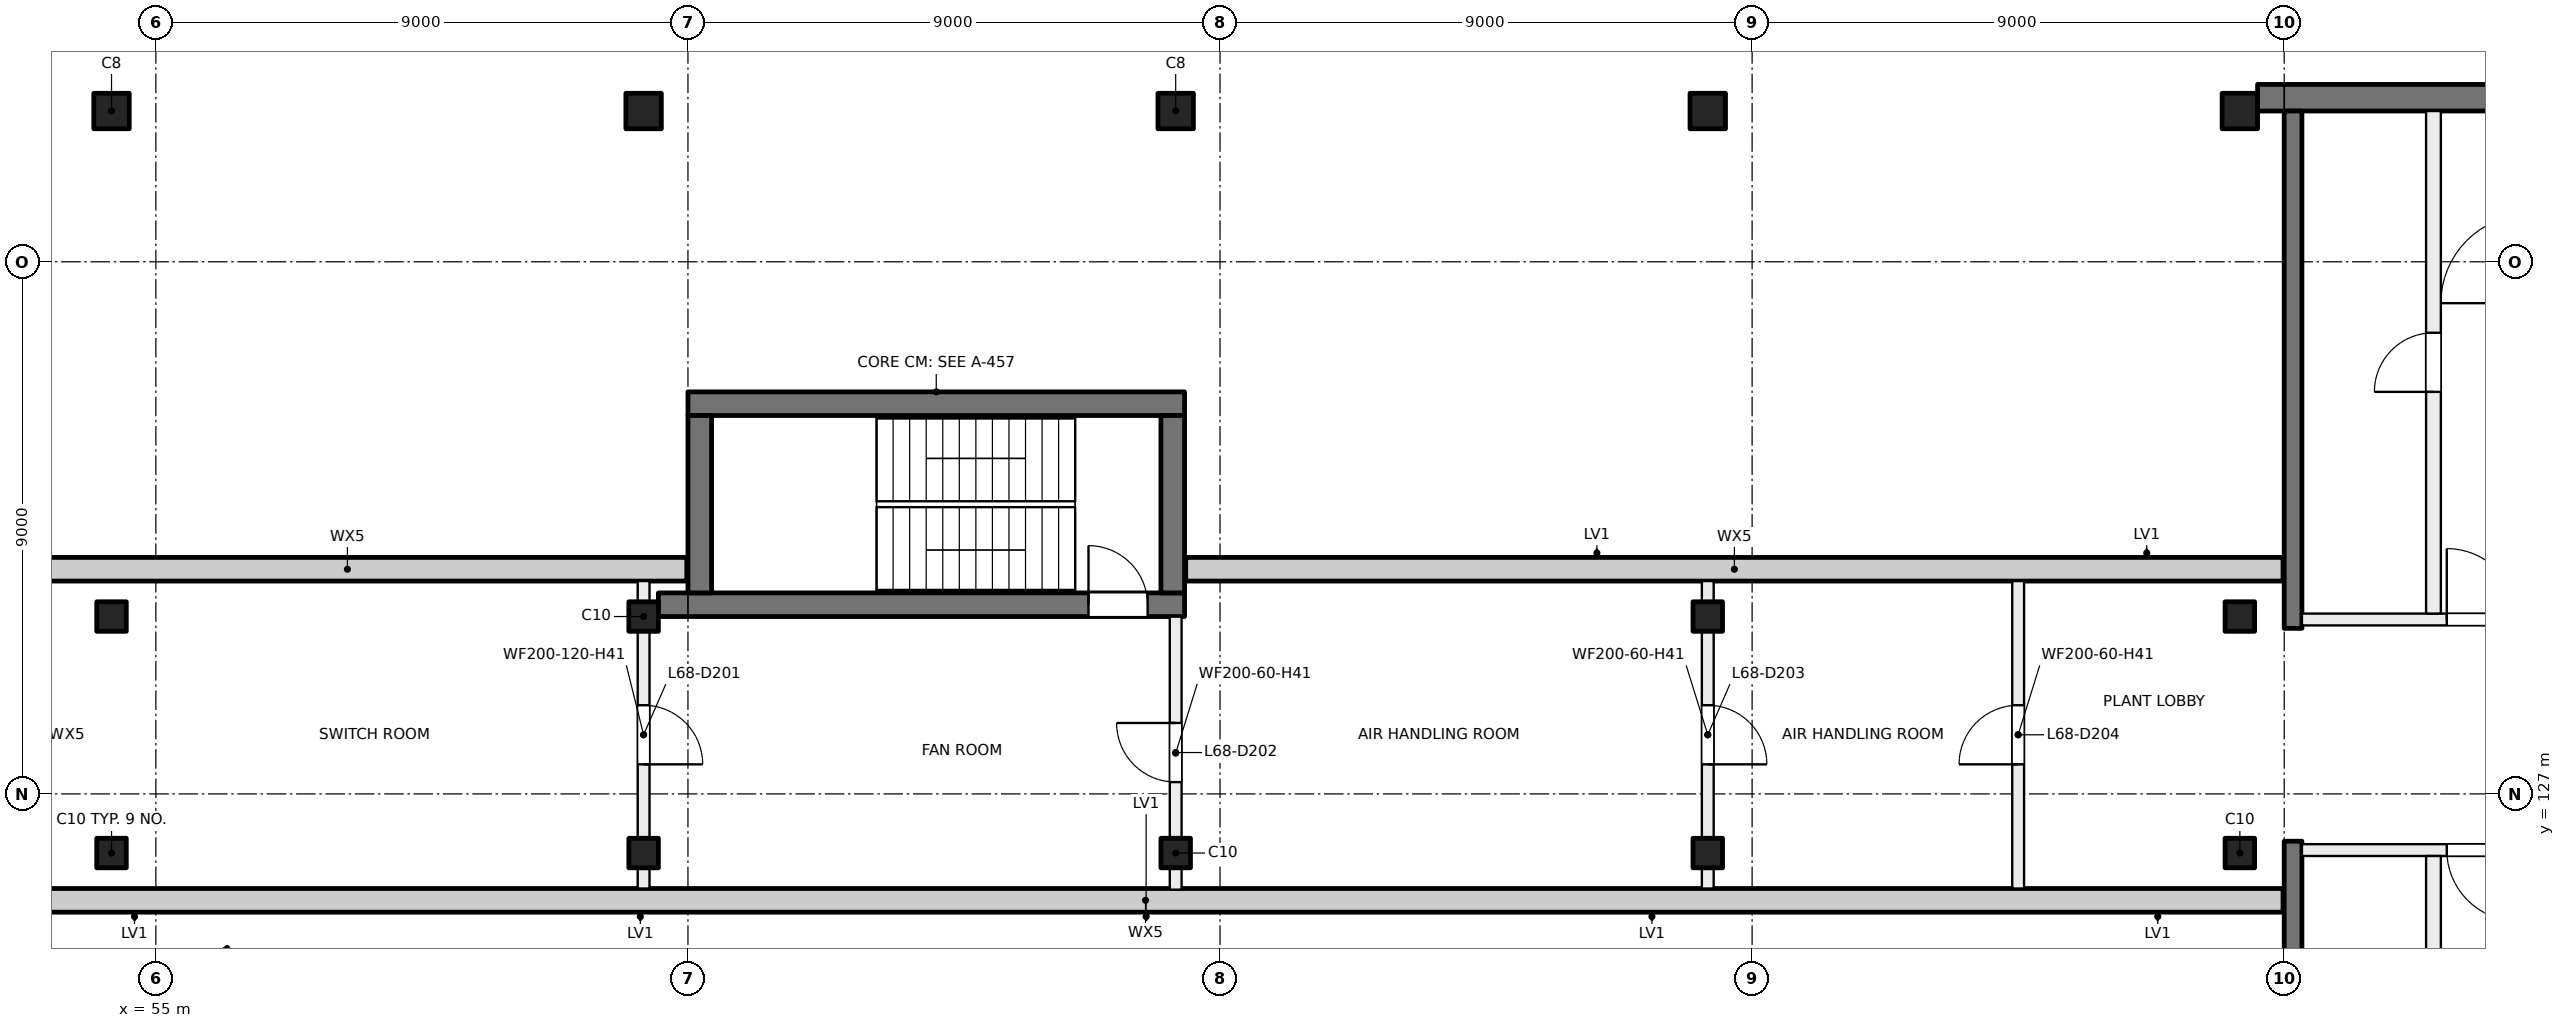
"""IFC4 building model, lengths in metres.
Left out: names, types, materials, properties, quantities, classifications, styles, units other than length and angle.
Written with IfcOpenShell. Run it as: python <this file> out.ifc"""

import sys

from ifc_helpers import new_model, si_unit, direction, frame, frame_2d, origin, origin_2d, place, context, subcontext, project, spatial, rectangle, hollow_rectangle, extrude, element, fill, save


model = new_model("IFC4")
c1 = context("Model", 3, precision=1e-05, world=origin(), true_north=direction((0.0, 1.0)))
c2 = subcontext(c1, "Body", "Model", "MODEL_VIEW")
j1 = project(units=[si_unit("LENGTHUNIT", "METRE"), si_unit("PLANEANGLEUNIT", "RADIAN")], contexts=[c1])
p1 = place(None, origin())
s1 = spatial("IfcSite", under=j1, at=p1, CompositionType="ELEMENT")
p2 = place(p1, origin())
s2 = spatial("IfcBuilding", under=s1, at=p2, CompositionType="ELEMENT")
p3 = place(p2, frame((0.0, 0.0, 286.5)))
s3 = spatial("IfcBuildingStorey", under=s2, at=p3, CompositionType="ELEMENT", Elevation=286.5)
p4 = place(p3, frame((56.036, 123.43, 0.0), z_axis=(0.0, 0.0, 1.0), x_axis=(0.573576436351, -0.819152044289, 0.0)))
e1 = element("IfcColumn", 1, at=p4, inside=s3, PredefinedType="COLUMN", context=c2, shape_type="SweptSolid", body=[
    extrude(hollow_rectangle(XDim=1.4, YDim=1.4, WallThickness=0.025, at=origin_2d()), origin(), (0.0, 0.0, 1.0), 4.5),
])
for number, where, z_axis, x_axis in (
    (2, (54.25, 130.0, 0.0), (0.0, 0.0, 1.0), (1.0, 0.0, 0.0)),
    (3, (63.25, 130.0, 0.0), (0.0, 0.0, 1.0), (1.0, 0.0, 0.0)),
    (4, (81.25, 130.0, 0.0), (0.0, 0.0, 1.0), (1.0, 0.0, 0.0)),
    (5, (90.25, 130.0, 0.0), (0.0, 0.0, 1.0), (1.0, 0.0, 0.0)),
    (6, (54.25, 126.0, 0.0), (0.0, 0.0, 1.0), (1.0, 0.0, 0.0)),
    (7, (63.25, 126.0, 0.0), (0.0, 0.0, 1.0), (1.0, 0.0, 0.0)),
    (8, (72.25, 126.0, 0.0), (0.0, 0.0, 1.0), (1.0, 0.0, 0.0)),
    (9, (81.25, 126.0, 0.0), (0.0, 0.0, 1.0), (1.0, 0.0, 0.0)),
    (10, (90.25, 126.0, 0.0), (0.0, 0.0, 1.0), (1.0, 0.0, 0.0)),
):
    element("IfcColumn", number, at=place(p3, frame(where, z_axis=z_axis, x_axis=x_axis)), inside=s3, PredefinedType="COLUMN", context=c2, shape_type="SweptSolid", body=[
        extrude(rectangle(XDim=0.5, YDim=0.5, at=origin_2d()), origin(), (0.0, 0.0, 1.0), 4.5),
    ])
for number, where, z_axis, x_axis in (
    (11, (54.25, 138.55, 0.0), (0.0, 0.0, 1.0), (1.0, 0.0, 0.0)),
    (12, (63.25, 138.55, 0.0), (0.0, 0.0, 1.0), (1.0, 0.0, 0.0)),
    (13, (72.25, 138.55, 0.0), (0.0, 0.0, 1.0), (1.0, 0.0, 0.0)),
    (14, (81.25, 138.55, 0.0), (0.0, 0.0, 1.0), (1.0, 0.0, 0.0)),
    (15, (90.25, 138.55, 0.0), (0.0, 0.0, 1.0), (1.0, 0.0, 0.0)),
):
    element("IfcColumn", number, at=place(p3, frame(where, z_axis=z_axis, x_axis=x_axis)), inside=s3, PredefinedType="COLUMN", context=c2, shape_type="SweptSolid", body=[
        extrude(rectangle(XDim=0.6, YDim=0.6, at=origin_2d()), origin(), (0.0, 0.0, 1.0), 4.5),
    ])
p5 = place(p3, frame((99.6, 138.775, 0.0), z_axis=(0.0, 0.0, 1.0), x_axis=(-1.0, 0.0, 0.0)))
e16 = element("IfcWall", 16, at=p5, inside=s3, PredefinedType="SHEAR", context=c2, shape_type="SweptSolid", body=[
    extrude(rectangle(XDim=9.05, YDim=0.45, at=frame_2d((4.525, 0.0))), origin(), (0.0, 0.0, 1.0), 4.5),
])
for number, where, z_axis, x_axis in (
    (17, (91.15, 138.55, 0.0), (0.0, 0.0, 1.0), (0.0, -1.0, 0.0)),
    (18, (91.15, 126.2, 0.0), (0.0, 0.0, 1.0), (0.0, -1.0, 0.0)),
):
    element("IfcWall", number, at=place(p3, frame(where, z_axis=z_axis, x_axis=x_axis)), inside=s3, PredefinedType="SHEAR", context=c2, shape_type="SweptSolid", body=[
        extrude(rectangle(XDim=8.75, YDim=0.3, at=frame_2d((4.375, 0.0))), origin(), (0.0, 0.0, 1.0), 4.5),
    ])
p6 = place(p3, frame((63.5, 130.2, 0.0), z_axis=(0.0, 0.0, 1.0), x_axis=(1.0, 0.0, 0.0)))
e19 = element("IfcWall", 19, at=p6, inside=s3, PredefinedType="SHEAR", context=c2, shape_type="SweptSolid", body=[
    extrude(rectangle(XDim=8.9, YDim=0.4, at=frame_2d((4.45, 0.0))), origin(), (0.0, 0.0, 1.0), 4.5),
])
p7 = place(p6, frame((7.275, 0.0, 0.0)))
e20 = element("IfcOpeningElement", 20, at=p7, cuts=e19, PredefinedType="OPENING", context=c2, shape_type="SweptSolid", body=[
    extrude(rectangle(XDim=1.0, YDim=2.1, at=frame_2d((0.5, 1.05))), frame((0.0, 0.21, 0.0), z_axis=(0.0, -1.0, 0.0), x_axis=(1.0, 0.0, 0.0)), (0.0, 0.0, 1.0), 0.42),
])
p8 = place(p3, frame((64.0, 133.6, 0.0), z_axis=(0.0, 0.0, 1.0), x_axis=(1.0, 0.0, 0.0)))
e21 = element("IfcWall", 21, at=p8, inside=s3, PredefinedType="SHEAR", context=c2, shape_type="SweptSolid", body=[
    extrude(rectangle(XDim=8.4, YDim=0.4, at=frame_2d((4.2, 0.0))), origin(), (0.0, 0.0, 1.0), 4.5),
])
for number, where, z_axis, x_axis in (
    (22, (64.2, 130.4, 0.0), (0.0, 0.0, 1.0), (0.0, 1.0, 0.0)),
    (23, (72.2, 130.4, 0.0), (0.0, 0.0, 1.0), (0.0, 1.0, 0.0)),
):
    element("IfcWall", number, at=place(p3, frame(where, z_axis=z_axis, x_axis=x_axis)), inside=s3, PredefinedType="SHEAR", context=c2, shape_type="SweptSolid", body=[
        extrude(rectangle(XDim=3.0, YDim=0.4, at=frame_2d((1.5, 0.0))), origin(), (0.0, 0.0, 1.0), 4.5),
    ])
p9 = place(p3, frame((52.5, 130.8, 0.0), z_axis=(0.0, 0.0, 1.0), x_axis=(1.0, 0.0, 0.0)))
e24 = element("IfcWall", 24, at=p9, inside=s3, PredefinedType="SOLIDWALL", context=c2, shape_type="SweptSolid", body=[
    extrude(rectangle(XDim=11.48, YDim=0.4, at=frame_2d((5.74, 0.0))), origin(), (0.0, 0.0, 1.0), 4.125),
])
p10 = place(p3, frame((90.98, 125.2, 0.0), z_axis=(0.0, 0.0, 1.0), x_axis=(-1.0, 0.0, 0.0)))
e25 = element("IfcWall", 25, at=p10, inside=s3, PredefinedType="SOLIDWALL", context=c2, shape_type="SweptSolid", body=[
    extrude(rectangle(XDim=38.48, YDim=0.4, at=frame_2d((19.24, 0.0))), origin(), (0.0, 0.0, 1.0), 4.125),
])
p11 = place(p3, frame((72.42, 130.8, 0.0), z_axis=(0.0, 0.0, 1.0), x_axis=(1.0, 0.0, 0.0)))
e26 = element("IfcWall", 26, at=p11, inside=s3, PredefinedType="SOLIDWALL", context=c2, shape_type="SweptSolid", body=[
    extrude(rectangle(XDim=18.56, YDim=0.4, at=frame_2d((9.28, 0.0))), origin(), (0.0, 0.0, 1.0), 4.125),
])
p12 = place(p3, frame((95.25, 126.05, 0.0), z_axis=(0.0, 0.0, 1.0), x_axis=(-1.0, 0.0, 0.0)))
e27 = element("IfcWall", 27, at=p12, inside=s3, PredefinedType="PARTITIONING", context=c2, shape_type="SweptSolid", body=[
    extrude(rectangle(XDim=3.95, YDim=0.2, at=frame_2d((1.975, 0.0))), origin(), (0.0, 0.0, 1.0), 4.125),
])
p13 = place(p12, frame((0.3, 0.0, 0.0)))
e28 = element("IfcOpeningElement", 28, at=p13, cuts=e27, PredefinedType="OPENING", context=c2, shape_type="SweptSolid", body=[
    extrude(rectangle(XDim=1.2, YDim=2.1, at=frame_2d((0.6, 1.05))), frame((0.0, 0.11, 0.0), z_axis=(0.0, -1.0, 0.0), x_axis=(1.0, 0.0, 0.0)), (0.0, 0.0, 1.0), 0.22),
])
p14 = place(p3, frame((93.525, 117.45, 0.0), z_axis=(0.0, 0.0, 1.0), x_axis=(0.0, 1.0, 0.0)))
e29 = element("IfcWall", 29, at=p14, inside=s3, PredefinedType="PARTITIONING", context=c2, shape_type="SweptSolid", body=[
    extrude(rectangle(XDim=8.5, YDim=0.25, at=frame_2d((4.25, 0.0))), origin(), (0.0, 0.0, 1.0), 4.125),
])
p15 = place(p14, frame((5.29, 0.0, 0.0)))
e30 = element("IfcOpeningElement", 30, at=p15, cuts=e29, PredefinedType="OPENING", context=c2, shape_type="SweptSolid", body=[
    extrude(rectangle(XDim=0.8, YDim=2.1, at=frame_2d((0.4, 1.05))), frame((0.0, 0.135, 0.0), z_axis=(0.0, -1.0, 0.0), x_axis=(1.0, 0.0, 0.0)), (0.0, 0.0, 1.0), 0.27),
])
p16 = place(p14, frame((0.99, 0.0, 0.0)))
e31 = element("IfcOpeningElement", 31, at=p16, cuts=e29, PredefinedType="OPENING", context=c2, shape_type="SweptSolid", body=[
    extrude(rectangle(XDim=0.8, YDim=2.1, at=frame_2d((0.4, 1.05))), frame((0.0, 0.135, 0.0), z_axis=(0.0, -1.0, 0.0), x_axis=(1.0, 0.0, 0.0)), (0.0, 0.0, 1.0), 0.27),
])
p17 = place(p3, frame((91.3, 129.95, 0.0), z_axis=(0.0, 0.0, 1.0), x_axis=(1.0, 0.0, 0.0)))
e32 = element("IfcWall", 32, at=p17, inside=s3, PredefinedType="PARTITIONING", context=c2, shape_type="SweptSolid", body=[
    extrude(rectangle(XDim=3.95, YDim=0.2, at=frame_2d((1.975, 0.0))), origin(), (0.0, 0.0, 1.0), 4.125),
])
p18 = place(p17, frame((2.45, 0.0, 0.0)))
e33 = element("IfcOpeningElement", 33, at=p18, cuts=e32, PredefinedType="OPENING", context=c2, shape_type="SweptSolid", body=[
    extrude(rectangle(XDim=1.2, YDim=2.1, at=frame_2d((0.6, 1.05))), frame((0.0, 0.11, 0.0), z_axis=(0.0, -1.0, 0.0), x_axis=(1.0, 0.0, 0.0)), (0.0, 0.0, 1.0), 0.22),
])
p19 = place(p3, frame((93.525, 130.05, 0.0), z_axis=(0.0, 0.0, 1.0), x_axis=(0.0, 1.0, 0.0)))
e34 = element("IfcWall", 34, at=p19, inside=s3, PredefinedType="PARTITIONING", context=c2, shape_type="SweptSolid", body=[
    extrude(rectangle(XDim=8.5, YDim=0.25, at=frame_2d((4.25, 0.0))), origin(), (0.0, 0.0, 1.0), 4.125),
])
p20 = place(p19, frame((3.75, 0.0, 0.0)))
e35 = element("IfcOpeningElement", 35, at=p20, cuts=e34, PredefinedType="OPENING", context=c2, shape_type="SweptSolid", body=[
    extrude(rectangle(XDim=1.0, YDim=2.1, at=frame_2d((0.5, 1.05))), frame((0.0, 0.135, 0.0), z_axis=(0.0, -1.0, 0.0), x_axis=(1.0, 0.0, 0.0)), (0.0, 0.0, 1.0), 0.27),
])
p21 = place(p3, frame((63.25, 130.6, 0.0), z_axis=(0.0, 0.0, 1.0), x_axis=(0.0, -1.0, 0.0)))
e36 = element("IfcWall", 36, at=p21, inside=s3, PredefinedType="PARTITIONING", context=c2, shape_type="SweptSolid", body=[
    extrude(rectangle(XDim=5.2, YDim=0.2, at=frame_2d((2.6, 0.0))), origin(), (0.0, 0.0, 1.0), 4.125),
])
p22 = place(p21, frame((2.1, 0.0, 0.0)))
e37 = element("IfcOpeningElement", 37, at=p22, cuts=e36, PredefinedType="OPENING", context=c2, shape_type="SweptSolid", body=[
    extrude(rectangle(XDim=1.0, YDim=2.1, at=frame_2d((0.5, 1.05))), frame((0.0, 0.11, 0.0), z_axis=(0.0, -1.0, 0.0), x_axis=(1.0, 0.0, 0.0)), (0.0, 0.0, 1.0), 0.22),
])
p23 = place(p3, frame((72.25, 130.0, 0.0), z_axis=(0.0, 0.0, 1.0), x_axis=(0.0, -1.0, 0.0)))
e38 = element("IfcWall", 38, at=p23, inside=s3, PredefinedType="PARTITIONING", context=c2, shape_type="SweptSolid", body=[
    extrude(rectangle(XDim=4.62, YDim=0.2, at=frame_2d((2.31, 0.0))), origin(), (0.0, 0.0, 1.0), 4.125),
])
p24 = place(p23, frame((1.8, 0.0, 0.0)))
e39 = element("IfcOpeningElement", 39, at=p24, cuts=e38, PredefinedType="OPENING", context=c2, shape_type="SweptSolid", body=[
    extrude(rectangle(XDim=1.0, YDim=2.1, at=frame_2d((0.5, 1.05))), frame((0.0, 0.11, 0.0), z_axis=(0.0, -1.0, 0.0), x_axis=(1.0, 0.0, 0.0)), (0.0, 0.0, 1.0), 0.22),
])
p25 = place(p3, frame((81.25, 130.6, 0.0), z_axis=(0.0, 0.0, 1.0), x_axis=(0.0, -1.0, 0.0)))
e40 = element("IfcWall", 40, at=p25, inside=s3, PredefinedType="PARTITIONING", context=c2, shape_type="SweptSolid", body=[
    extrude(rectangle(XDim=5.2, YDim=0.2, at=frame_2d((2.6, 0.0))), origin(), (0.0, 0.0, 1.0), 4.125),
])
p26 = place(p25, frame((2.1, 0.0, 0.0)))
e41 = element("IfcOpeningElement", 41, at=p26, cuts=e40, PredefinedType="OPENING", context=c2, shape_type="SweptSolid", body=[
    extrude(rectangle(XDim=1.0, YDim=2.1, at=frame_2d((0.5, 1.05))), frame((0.0, 0.11, 0.0), z_axis=(0.0, -1.0, 0.0), x_axis=(1.0, 0.0, 0.0)), (0.0, 0.0, 1.0), 0.22),
])
p27 = place(p3, frame((86.5, 125.4, 0.0), z_axis=(0.0, 0.0, 1.0), x_axis=(0.0, 1.0, 0.0)))
e42 = element("IfcWall", 42, at=p27, inside=s3, PredefinedType="PARTITIONING", context=c2, shape_type="SweptSolid", body=[
    extrude(rectangle(XDim=5.2, YDim=0.2, at=frame_2d((2.6, 0.0))), origin(), (0.0, 0.0, 1.0), 4.125),
])
p28 = place(p27, frame((2.1, 0.0, 0.0)))
e43 = element("IfcOpeningElement", 43, at=p28, cuts=e42, PredefinedType="OPENING", context=c2, shape_type="SweptSolid", body=[
    extrude(rectangle(XDim=1.0, YDim=2.1, at=frame_2d((0.5, 1.05))), frame((0.0, 0.11, 0.0), z_axis=(0.0, -1.0, 0.0), x_axis=(1.0, 0.0, 0.0)), (0.0, 0.0, 1.0), 0.22),
])
p29 = place(p13, origin())
e44 = element("IfcDoor", 44, at=p29, inside=s3, OperationType="DOUBLE_DOOR_SINGLE_SWING", PredefinedType="DOOR", context=c2, shape_type="SweptSolid", body=[
    extrude(rectangle(XDim=1.2, YDim=2.1, at=frame_2d((0.6, 1.05))), frame((0.0, 0.025, 0.0), z_axis=(0.0, -1.0, 0.0), x_axis=(1.0, 0.0, 0.0)), (0.0, 0.0, 1.0), 0.05),
])
fill(e28, e44)
p30 = place(p18, origin())
e45 = element("IfcDoor", 45, at=p30, inside=s3, OperationType="DOUBLE_DOOR_SINGLE_SWING", PredefinedType="DOOR", context=c2, shape_type="SweptSolid", body=[
    extrude(rectangle(XDim=1.2, YDim=2.1, at=frame_2d((0.6, 1.05))), frame((0.0, 0.025, 0.0), z_axis=(0.0, -1.0, 0.0), x_axis=(1.0, 0.0, 0.0)), (0.0, 0.0, 1.0), 0.05),
])
fill(e33, e45)
p31 = place(p20, origin())
e46 = element("IfcDoor", 46, at=p31, inside=s3, OperationType="SINGLE_SWING_RIGHT", PredefinedType="DOOR", context=c2, shape_type="SweptSolid", body=[
    extrude(rectangle(XDim=1.0, YDim=2.1, at=frame_2d((0.5, 1.05))), frame((0.0, 0.025, 0.0), z_axis=(0.0, -1.0, 0.0), x_axis=(1.0, 0.0, 0.0)), (0.0, 0.0, 1.0), 0.05),
])
fill(e35, e46)
p32 = place(p7, origin())
e47 = element("IfcDoor", 47, at=p32, inside=s3, OperationType="SINGLE_SWING_LEFT", PredefinedType="DOOR", context=c2, shape_type="SweptSolid", body=[
    extrude(rectangle(XDim=1.0, YDim=2.1, at=frame_2d((0.5, 1.05))), frame((0.0, 0.025, 0.0), z_axis=(0.0, -1.0, 0.0), x_axis=(1.0, 0.0, 0.0)), (0.0, 0.0, 1.0), 0.05),
])
fill(e20, e47)
p33 = place(p22, origin())
e48 = element("IfcDoor", 48, at=p33, inside=s3, OperationType="SINGLE_SWING_RIGHT", PredefinedType="DOOR", context=c2, shape_type="SweptSolid", body=[
    extrude(rectangle(XDim=1.0, YDim=2.1, at=frame_2d((0.5, 1.05))), frame((0.0, 0.025, 0.0), z_axis=(0.0, -1.0, 0.0), x_axis=(1.0, 0.0, 0.0)), (0.0, 0.0, 1.0), 0.05),
])
fill(e37, e48)
p34 = place(p24, origin())
e49 = element("IfcDoor", 49, at=p34, inside=s3, OperationType="SINGLE_SWING_LEFT", PredefinedType="DOOR", context=c2, shape_type="SweptSolid", body=[
    extrude(rectangle(XDim=1.0, YDim=2.1, at=frame_2d((0.5, 1.05))), frame((0.0, 0.025, 0.0), z_axis=(0.0, -1.0, 0.0), x_axis=(1.0, 0.0, 0.0)), (0.0, 0.0, 1.0), 0.05),
])
fill(e39, e49)
p35 = place(p26, origin())
e50 = element("IfcDoor", 50, at=p35, inside=s3, OperationType="SINGLE_SWING_RIGHT", PredefinedType="DOOR", context=c2, shape_type="SweptSolid", body=[
    extrude(rectangle(XDim=1.0, YDim=2.1, at=frame_2d((0.5, 1.05))), frame((0.0, 0.025, 0.0), z_axis=(0.0, -1.0, 0.0), x_axis=(1.0, 0.0, 0.0)), (0.0, 0.0, 1.0), 0.05),
])
fill(e41, e50)
p36 = place(p28, origin())
e51 = element("IfcDoor", 51, at=p36, inside=s3, OperationType="SINGLE_SWING_LEFT", PredefinedType="DOOR", context=c2, shape_type="SweptSolid", body=[
    extrude(rectangle(XDim=1.0, YDim=2.1, at=frame_2d((0.5, 1.05))), frame((0.0, 0.025, 0.0), z_axis=(0.0, -1.0, 0.0), x_axis=(1.0, 0.0, 0.0)), (0.0, 0.0, 1.0), 0.05),
])
fill(e43, e51)
save(model, sys.argv[1])
